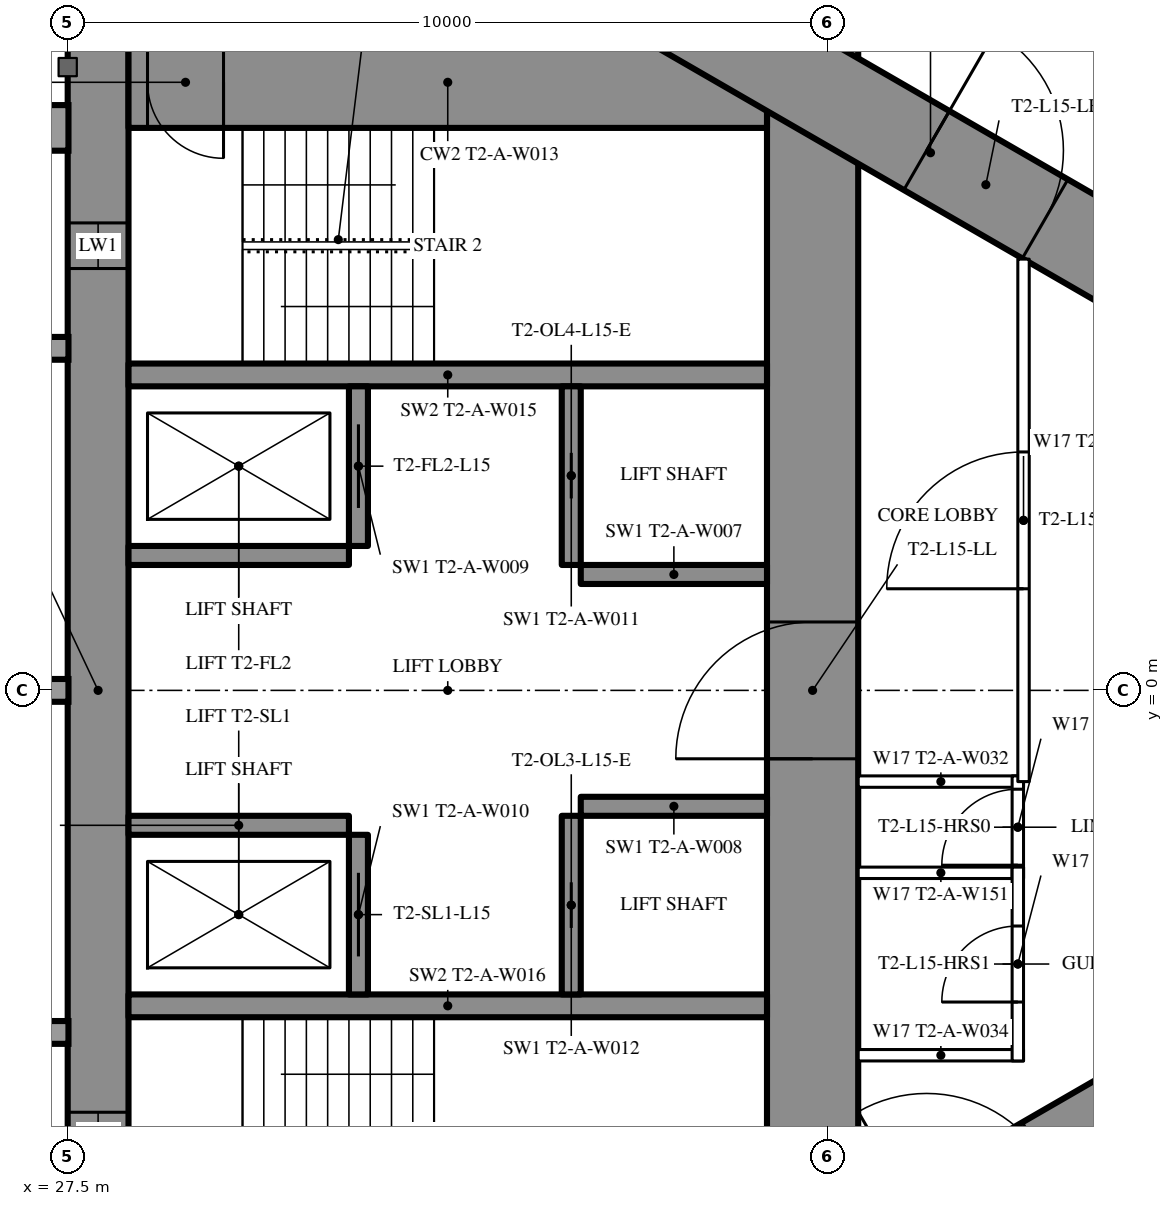
"""IFC4 building model, lengths in metres.
Left out: names, types, materials, properties, quantities, classifications, styles, units other than length and angle.
Written with IfcOpenShell. Run it as: python <this file> out.ifc"""

import sys

from ifc_helpers import new_model, si_unit, direction, frame, frame_2d, origin, place, context, subcontext, project, spatial, rectangle, extrude, element, fill, save


model = new_model("IFC4")
c1 = context("Model", 3, precision=1e-05, world=origin(), true_north=direction((0.0, 1.0)))
c2 = subcontext(c1, "Body", "Model", "MODEL_VIEW")
j1 = project(units=[si_unit("LENGTHUNIT", "METRE"), si_unit("PLANEANGLEUNIT", "RADIAN")], contexts=[c1])
p1 = place(None, origin())
s1 = spatial("IfcSite", under=j1, at=p1, CompositionType="ELEMENT")
p2 = place(p1, origin())
s2 = spatial("IfcBuilding", under=s1, at=p2, CompositionType="ELEMENT")
p3 = place(p2, frame((0.0, 0.0, 60.0)))
s3 = spatial("IfcBuildingStorey", under=s2, at=p3, CompositionType="ELEMENT", Elevation=60.0)
p4 = place(p3, frame((27.9, -8.6, 0.0), z_axis=(0.0, 0.0, 1.0), x_axis=(0.0, 1.0, 0.0)))
e1 = element("IfcWall", 1, at=p4, inside=s3, PredefinedType="SHEAR", context=c2, shape_type="SweptSolid", body=[
    extrude(rectangle(XDim=17.2, YDim=0.8, at=frame_2d((8.6, 0.0))), origin(), (0.0, 0.0, 1.0), 3.5),
])
p5 = place(p4, frame((2.45, 0.0, 0.6)))
e2 = element("IfcOpeningElement", 2, at=p5, cuts=e1, PredefinedType="OPENING", context=c2, shape_type="SweptSolid", body=[
    extrude(rectangle(XDim=0.6, YDim=2.1, at=frame_2d((0.3, 1.05))), frame((0.0, 0.41, 0.0), z_axis=(0.0, -1.0, 0.0), x_axis=(1.0, 0.0, 0.0)), (0.0, 0.0, 1.0), 0.82),
])
p6 = place(p4, frame((14.15, 0.0, 0.6)))
e3 = element("IfcOpeningElement", 3, at=p6, cuts=e1, PredefinedType="OPENING", context=c2, shape_type="SweptSolid", body=[
    extrude(rectangle(XDim=0.6, YDim=2.1, at=frame_2d((0.3, 1.05))), frame((0.0, 0.41, 0.0), z_axis=(0.0, -1.0, 0.0), x_axis=(1.0, 0.0, 0.0)), (0.0, 0.0, 1.0), 0.82),
])
p7 = place(p3, frame((37.3, -8.6, 0.0), z_axis=(0.0, 0.0, 1.0), x_axis=(0.0, 1.0, 0.0)))
e4 = element("IfcWall", 4, at=p7, inside=s3, PredefinedType="SHEAR", context=c2, shape_type="SweptSolid", body=[
    extrude(rectangle(XDim=17.2, YDim=1.2, at=frame_2d((8.6, 0.0))), origin(), (0.0, 0.0, 1.0), 3.5),
])
p8 = place(p7, frame((7.7, 0.0, 0.0)))
e5 = element("IfcOpeningElement", 5, at=p8, cuts=e4, PredefinedType="OPENING", context=c2, shape_type="SweptSolid", body=[
    extrude(rectangle(XDim=1.8, YDim=2.2, at=frame_2d((0.9, 1.1))), frame((0.0, 0.61, 0.0), z_axis=(0.0, -1.0, 0.0), x_axis=(1.0, 0.0, 0.0)), (0.0, 0.0, 1.0), 1.22),
])
p9 = place(p3, frame((28.3, 8.0, 0.0), z_axis=(0.0, 0.0, 1.0), x_axis=(1.0, 0.0, 0.0)))
e6 = element("IfcWall", 6, at=p9, inside=s3, PredefinedType="SHEAR", context=c2, shape_type="SweptSolid", body=[
    extrude(rectangle(XDim=8.4, YDim=1.2, at=frame_2d((4.2, 0.0))), origin(), (0.0, 0.0, 1.0), 3.5),
])
p10 = place(p9, frame((0.25, 0.0, 0.0)))
e7 = element("IfcOpeningElement", 7, at=p10, cuts=e6, PredefinedType="OPENING", context=c2, shape_type="SweptSolid", body=[
    extrude(rectangle(XDim=1.0, YDim=2.2, at=frame_2d((0.5, 1.1))), frame((0.0, 0.61, 0.0), z_axis=(0.0, -1.0, 0.0), x_axis=(1.0, 0.0, 0.0)), (0.0, 0.0, 1.0), 1.22),
])
for number, where, z_axis, x_axis in (
    (8, (28.3, -4.15, 0.0), (0.0, 0.0, 1.0), (1.0, 0.0, 0.0)),
    (9, (28.3, 4.15, 0.0), (0.0, 0.0, 1.0), (1.0, 0.0, 0.0)),
):
    element("IfcWall", number, at=place(p3, frame(where, z_axis=z_axis, x_axis=x_axis)), inside=s3, PredefinedType="SHEAR", context=c2, shape_type="SweptSolid", body=[
        extrude(rectangle(XDim=8.4, YDim=0.3, at=frame_2d((4.2, 0.0))), origin(), (0.0, 0.0, 1.0), 3.5),
    ])
p11 = place(p3, frame((31.325, -4.0, 0.0), z_axis=(0.0, 0.0, 1.0), x_axis=(0.0, 1.0, 0.0)))
e10 = element("IfcWall", 10, at=p11, inside=s3, PredefinedType="SHEAR", context=c2, shape_type="SweptSolid", body=[
    extrude(rectangle(XDim=2.1, YDim=0.25, at=frame_2d((1.05, 0.0))), origin(), (0.0, 0.0, 1.0), 3.5),
])
p12 = place(p11, frame((0.5, 0.0, 0.0)))
e11 = element("IfcOpeningElement", 11, at=p12, cuts=e10, PredefinedType="OPENING", context=c2, shape_type="SweptSolid", body=[
    extrude(rectangle(XDim=1.1, YDim=2.2, at=frame_2d((0.55, 1.1))), frame((0.0, 0.135, 0.0), z_axis=(0.0, -1.0, 0.0), x_axis=(1.0, 0.0, 0.0)), (0.0, 0.0, 1.0), 0.27),
])
p13 = place(p3, frame((34.125, -4.0, 0.0), z_axis=(0.0, 0.0, 1.0), x_axis=(0.0, 1.0, 0.0)))
e12 = element("IfcWall", 12, at=p13, inside=s3, PredefinedType="SHEAR", context=c2, shape_type="SweptSolid", body=[
    extrude(rectangle(XDim=2.35, YDim=0.25, at=frame_2d((1.175, 0.0))), origin(), (0.0, 0.0, 1.0), 3.5),
])
p14 = place(p13, frame((0.875, 0.0, 0.0)))
e13 = element("IfcOpeningElement", 13, at=p14, cuts=e12, PredefinedType="OPENING", context=c2, shape_type="SweptSolid", body=[
    extrude(rectangle(XDim=0.6, YDim=2.0, at=frame_2d((0.3, 1.0))), frame((0.0, 0.135, 0.0), z_axis=(0.0, -1.0, 0.0), x_axis=(1.0, 0.0, 0.0)), (0.0, 0.0, 1.0), 0.27),
])
p15 = place(p3, frame((28.3, -1.775, 0.0), z_axis=(0.0, 0.0, 1.0), x_axis=(1.0, 0.0, 0.0)))
e14 = element("IfcWall", 14, at=p15, inside=s3, PredefinedType="SHEAR", context=c2, shape_type="SweptSolid", body=[
    extrude(rectangle(XDim=2.9, YDim=0.25, at=frame_2d((1.45, 0.0))), origin(), (0.0, 0.0, 1.0), 3.5),
])
p16 = place(p3, frame((34.25, -1.525, 0.0), z_axis=(0.0, 0.0, 1.0), x_axis=(1.0, 0.0, 0.0)))
e15 = element("IfcWall", 15, at=p16, inside=s3, PredefinedType="SHEAR", context=c2, shape_type="SweptSolid", body=[
    extrude(rectangle(XDim=2.45, YDim=0.25, at=frame_2d((1.225, 0.0))), origin(), (0.0, 0.0, 1.0), 3.5),
])
p17 = place(p3, frame((31.325, 1.9, 0.0), z_axis=(0.0, 0.0, 1.0), x_axis=(0.0, 1.0, 0.0)))
e16 = element("IfcWall", 16, at=p17, inside=s3, PredefinedType="SHEAR", context=c2, shape_type="SweptSolid", body=[
    extrude(rectangle(XDim=2.1, YDim=0.25, at=frame_2d((1.05, 0.0))), origin(), (0.0, 0.0, 1.0), 3.5),
])
p18 = place(p17, frame((0.5, 0.0, 0.0)))
e17 = element("IfcOpeningElement", 17, at=p18, cuts=e16, PredefinedType="OPENING", context=c2, shape_type="SweptSolid", body=[
    extrude(rectangle(XDim=1.1, YDim=2.2, at=frame_2d((0.55, 1.1))), frame((0.0, 0.135, 0.0), z_axis=(0.0, -1.0, 0.0), x_axis=(1.0, 0.0, 0.0)), (0.0, 0.0, 1.0), 0.27),
])
p19 = place(p3, frame((34.125, 1.65, 0.0), z_axis=(0.0, 0.0, 1.0), x_axis=(0.0, 1.0, 0.0)))
e18 = element("IfcWall", 18, at=p19, inside=s3, PredefinedType="SHEAR", context=c2, shape_type="SweptSolid", body=[
    extrude(rectangle(XDim=2.35, YDim=0.25, at=frame_2d((1.175, 0.0))), origin(), (0.0, 0.0, 1.0), 3.5),
])
p20 = place(p19, frame((0.875, 0.0, 0.0)))
e19 = element("IfcOpeningElement", 19, at=p20, cuts=e18, PredefinedType="OPENING", context=c2, shape_type="SweptSolid", body=[
    extrude(rectangle(XDim=0.6, YDim=2.0, at=frame_2d((0.3, 1.0))), frame((0.0, 0.135, 0.0), z_axis=(0.0, -1.0, 0.0), x_axis=(1.0, 0.0, 0.0)), (0.0, 0.0, 1.0), 0.27),
])
p21 = place(p3, frame((28.3, 1.775, 0.0), z_axis=(0.0, 0.0, 1.0), x_axis=(1.0, 0.0, 0.0)))
e20 = element("IfcWall", 20, at=p21, inside=s3, PredefinedType="SHEAR", context=c2, shape_type="SweptSolid", body=[
    extrude(rectangle(XDim=2.9, YDim=0.25, at=frame_2d((1.45, 0.0))), origin(), (0.0, 0.0, 1.0), 3.5),
])
p22 = place(p3, frame((34.25, 1.525, 0.0), z_axis=(0.0, 0.0, 1.0), x_axis=(1.0, 0.0, 0.0)))
e21 = element("IfcWall", 21, at=p22, inside=s3, PredefinedType="SHEAR", context=c2, shape_type="SweptSolid", body=[
    extrude(rectangle(XDim=2.45, YDim=0.25, at=frame_2d((1.225, 0.0))), origin(), (0.0, 0.0, 1.0), 3.5),
])
p23 = place(p3, frame((27.2, -13.8, 0.0), z_axis=(0.0, 0.0, 1.0), x_axis=(0.866027159892, 0.499996958321, 0.0)))
e22 = element("IfcWall", 22, at=p23, inside=s3, PredefinedType="SHEAR", context=c2, shape_type="SweptSolid", body=[
    extrude(rectangle(XDim=27.947, YDim=1.2, at=frame_2d((13.973, 0.0))), origin(), (0.0, 0.0, 1.0), 3.5),
])
p24 = place(p23, frame((4.6, 0.0, 0.0)))
e23 = element("IfcOpeningElement", 23, at=p24, cuts=e22, PredefinedType="OPENING", context=c2, shape_type="SweptSolid", body=[
    extrude(rectangle(XDim=1.0, YDim=2.2, at=frame_2d((0.5, 1.1))), frame((0.0, 0.61, 0.0), z_axis=(0.0, -1.0, 0.0), x_axis=(1.0, 0.0, 0.0)), (0.0, 0.0, 1.0), 1.22),
])
p25 = place(p23, frame((13.395, 0.0, 0.0)))
e24 = element("IfcOpeningElement", 24, at=p25, cuts=e22, PredefinedType="OPENING", context=c2, shape_type="SweptSolid", body=[
    extrude(rectangle(XDim=1.8, YDim=2.2, at=frame_2d((0.9, 1.1))), frame((0.0, 0.61, 0.0), z_axis=(0.0, -1.0, 0.0), x_axis=(1.0, 0.0, 0.0)), (0.0, 0.0, 1.0), 1.22),
])
p26 = place(p3, frame((27.2, 13.8, 0.0), z_axis=(0.0, 0.0, 1.0), x_axis=(0.866024515034, -0.500001539357, 0.0)))
e25 = element("IfcWall", 25, at=p26, inside=s3, PredefinedType="SHEAR", context=c2, shape_type="SweptSolid", body=[
    extrude(rectangle(XDim=26.907, YDim=1.2, at=frame_2d((13.454, 0.0))), origin(), (0.0, 0.0, 1.0), 3.5),
])
p27 = place(p26, frame((4.6, 0.0, 0.0)))
e26 = element("IfcOpeningElement", 26, at=p27, cuts=e25, PredefinedType="OPENING", context=c2, shape_type="SweptSolid", body=[
    extrude(rectangle(XDim=1.0, YDim=2.2, at=frame_2d((0.5, 1.1))), frame((0.0, 0.61, 0.0), z_axis=(0.0, -1.0, 0.0), x_axis=(1.0, 0.0, 0.0)), (0.0, 0.0, 1.0), 1.22),
])
p28 = place(p26, frame((13.395, 0.0, 0.0)))
e27 = element("IfcOpeningElement", 27, at=p28, cuts=e25, PredefinedType="OPENING", context=c2, shape_type="SweptSolid", body=[
    extrude(rectangle(XDim=1.8, YDim=2.2, at=frame_2d((0.9, 1.1))), frame((0.0, 0.61, 0.0), z_axis=(0.0, -1.0, 0.0), x_axis=(1.0, 0.0, 0.0)), (0.0, 0.0, 1.0), 1.22),
])
p29 = place(p3, frame((36.834, 10.894, 0.0), z_axis=(0.0, 0.0, 1.0), x_axis=(0.866028157229, -0.499995230863, 0.0)))
e28 = element("IfcWall", 28, at=p29, inside=s3, PredefinedType="PARTITIONING", context=c2, shape_type="SweptSolid", body=[
    extrude(rectangle(XDim=21.667, YDim=0.2, at=frame_2d((10.833, 0.0))), origin(), (0.0, 0.0, 1.0), 3.25),
])
p30 = place(p29, frame((14.55, 0.0, 0.0)))
e29 = element("IfcOpeningElement", 29, at=p30, cuts=e28, PredefinedType="OPENING", context=c2, shape_type="SweptSolid", body=[
    extrude(rectangle(XDim=0.95, YDim=2.2, at=frame_2d((0.475, 1.1))), frame((0.0, 0.11, 0.0), z_axis=(0.0, -1.0, 0.0), x_axis=(1.0, 0.0, 0.0)), (0.0, 0.0, 1.0), 0.22),
])
p31 = place(p29, frame((10.5, 0.0, 0.0)))
e30 = element("IfcOpeningElement", 30, at=p31, cuts=e28, PredefinedType="OPENING", context=c2, shape_type="SweptSolid", body=[
    extrude(rectangle(XDim=0.95, YDim=2.2, at=frame_2d((0.475, 1.1))), frame((0.0, 0.11, 0.0), z_axis=(0.0, -1.0, 0.0), x_axis=(1.0, 0.0, 0.0)), (0.0, 0.0, 1.0), 0.22),
])
p32 = place(p29, frame((4.292, 0.0, 0.0)))
e31 = element("IfcOpeningElement", 31, at=p32, cuts=e28, PredefinedType="OPENING", context=c2, shape_type="SweptSolid", body=[
    extrude(rectangle(XDim=1.0, YDim=2.2, at=frame_2d((0.5, 1.1))), frame((0.0, 0.11, 0.0), z_axis=(0.0, -1.0, 0.0), x_axis=(1.0, 0.0, 0.0)), (0.0, 0.0, 1.0), 0.22),
])
p33 = place(p29, frame((0.246, 0.0, 0.0)))
e32 = element("IfcOpeningElement", 32, at=p33, cuts=e28, PredefinedType="OPENING", context=c2, shape_type="SweptSolid", body=[
    extrude(rectangle(XDim=0.9, YDim=2.2, at=frame_2d((0.45, 1.1))), frame((0.0, 0.11, 0.0), z_axis=(0.0, -1.0, 0.0), x_axis=(1.0, 0.0, 0.0)), (0.0, 0.0, 1.0), 0.22),
])
p34 = place(p3, frame((37.96, -10.243, 0.0), z_axis=(0.0, 0.0, 1.0), x_axis=(0.866030548046, 0.499991089772, 0.0)))
e33 = element("IfcWall", 33, at=p34, inside=s3, PredefinedType="PARTITIONING", context=c2, shape_type="SweptSolid", body=[
    extrude(rectangle(XDim=12.849, YDim=0.2, at=frame_2d((6.425, 0.0))), origin(), (0.0, 0.0, 1.0), 3.25),
])
p35 = place(p34, frame((4.575, 0.0, 0.0)))
e34 = element("IfcOpeningElement", 34, at=p35, cuts=e33, PredefinedType="OPENING", context=c2, shape_type="SweptSolid", body=[
    extrude(rectangle(XDim=0.95, YDim=2.2, at=frame_2d((0.475, 1.1))), frame((0.0, 0.11, 0.0), z_axis=(0.0, -1.0, 0.0), x_axis=(1.0, 0.0, 0.0)), (0.0, 0.0, 1.0), 0.22),
])
p36 = place(p34, frame((0.6, 0.0, 0.0)))
e35 = element("IfcOpeningElement", 35, at=p36, cuts=e33, PredefinedType="OPENING", context=c2, shape_type="SweptSolid", body=[
    extrude(rectangle(XDim=0.95, YDim=2.2, at=frame_2d((0.475, 1.1))), frame((0.0, 0.11, 0.0), z_axis=(0.0, -1.0, 0.0), x_axis=(1.0, 0.0, 0.0)), (0.0, 0.0, 1.0), 0.22),
])
for number, where, z_axis, x_axis in (
    (36, (37.9, -1.2, 0.0), (0.0, 0.0, 1.0), (1.0, 0.0, 0.0)),
    (37, (37.9, -2.4, 0.0), (0.0, 0.0, 1.0), (1.0, 0.0, 0.0)),
    (38, (37.9, -4.8, 0.0), (0.0, 0.0, 1.0), (1.0, 0.0, 0.0)),
):
    element("IfcWall", number, at=place(p3, frame(where, z_axis=z_axis, x_axis=x_axis)), inside=s3, PredefinedType="PARTITIONING", context=c2, shape_type="SweptSolid", body=[
        extrude(rectangle(XDim=2.175, YDim=0.15, at=frame_2d((1.087, 0.0))), origin(), (0.0, 0.0, 1.0), 3.25),
    ])
p37 = place(p3, frame((40.0, -2.475, 0.0), z_axis=(0.0, 0.0, 1.0), x_axis=(0.0, 1.0, 0.0)))
e39 = element("IfcWall", 39, at=p37, inside=s3, PredefinedType="PARTITIONING", context=c2, shape_type="SweptSolid", body=[
    extrude(rectangle(XDim=1.35, YDim=0.15, at=frame_2d((0.675, 0.0))), origin(), (0.0, 0.0, 1.0), 3.25),
])
p38 = place(p37, frame((0.175, 0.0, 0.0)))
e40 = element("IfcOpeningElement", 40, at=p38, cuts=e39, PredefinedType="OPENING", context=c2, shape_type="SweptSolid", body=[
    extrude(rectangle(XDim=1.0, YDim=2.2, at=frame_2d((0.5, 1.1))), frame((0.0, 0.085, 0.0), z_axis=(0.0, -1.0, 0.0), x_axis=(1.0, 0.0, 0.0)), (0.0, 0.0, 1.0), 0.17),
])
p39 = place(p3, frame((40.0, -4.875, 0.0), z_axis=(0.0, 0.0, 1.0), x_axis=(0.0, 1.0, 0.0)))
e41 = element("IfcWall", 41, at=p39, inside=s3, PredefinedType="PARTITIONING", context=c2, shape_type="SweptSolid", body=[
    extrude(rectangle(XDim=2.55, YDim=0.15, at=frame_2d((1.275, 0.0))), origin(), (0.0, 0.0, 1.0), 3.25),
])
p40 = place(p39, frame((0.775, 0.0, 0.0)))
e42 = element("IfcOpeningElement", 42, at=p40, cuts=e41, PredefinedType="OPENING", context=c2, shape_type="SweptSolid", body=[
    extrude(rectangle(XDim=1.0, YDim=2.2, at=frame_2d((0.5, 1.1))), frame((0.0, 0.085, 0.0), z_axis=(0.0, -1.0, 0.0), x_axis=(1.0, 0.0, 0.0)), (0.0, 0.0, 1.0), 0.17),
])
p41 = place(p3, frame((40.075, -1.2, 0.0), z_axis=(0.0, 0.0, 1.0), x_axis=(0.0, 1.0, 0.0)))
e43 = element("IfcWall", 43, at=p41, inside=s3, PredefinedType="PARTITIONING", context=c2, shape_type="SweptSolid", body=[
    extrude(rectangle(XDim=6.874, YDim=0.15, at=frame_2d((3.437, 0.0))), origin(), (0.0, 0.0, 1.0), 3.25),
])
p42 = place(p41, frame((2.537, 0.0, 0.0)))
e44 = element("IfcOpeningElement", 44, at=p42, cuts=e43, PredefinedType="OPENING", context=c2, shape_type="SweptSolid", body=[
    extrude(rectangle(XDim=1.8, YDim=2.2, at=frame_2d((0.9, 1.1))), frame((0.0, 0.085, 0.0), z_axis=(0.0, -1.0, 0.0), x_axis=(1.0, 0.0, 0.0)), (0.0, 0.0, 1.0), 0.17),
])
p43 = place(p32, origin())
e45 = element("IfcDoor", 45, at=p43, inside=s3, OperationType="SINGLE_SWING_LEFT", PredefinedType="DOOR", context=c2, shape_type="SweptSolid", body=[
    extrude(rectangle(XDim=1.0, YDim=2.2, at=frame_2d((0.5, 1.1))), frame((0.0, 0.025, 0.0), z_axis=(0.0, -1.0, 0.0), x_axis=(1.0, 0.0, 0.0)), (0.0, 0.0, 1.0), 0.05),
])
fill(e31, e45)
p44 = place(p38, origin())
e46 = element("IfcDoor", 46, at=p44, inside=s3, OperationType="SINGLE_SWING_LEFT", PredefinedType="DOOR", context=c2, shape_type="SweptSolid", body=[
    extrude(rectangle(XDim=1.0, YDim=2.2, at=frame_2d((0.5, 1.1))), frame((0.0, 0.025, 0.0), z_axis=(0.0, -1.0, 0.0), x_axis=(1.0, 0.0, 0.0)), (0.0, 0.0, 1.0), 0.05),
])
fill(e40, e46)
p45 = place(p40, origin())
e47 = element("IfcDoor", 47, at=p45, inside=s3, OperationType="SINGLE_SWING_LEFT", PredefinedType="DOOR", context=c2, shape_type="SweptSolid", body=[
    extrude(rectangle(XDim=1.0, YDim=2.2, at=frame_2d((0.5, 1.1))), frame((0.0, 0.025, 0.0), z_axis=(0.0, -1.0, 0.0), x_axis=(1.0, 0.0, 0.0)), (0.0, 0.0, 1.0), 0.05),
])
fill(e42, e47)
p46 = place(p42, origin())
e48 = element("IfcDoor", 48, at=p46, inside=s3, OperationType="DOUBLE_DOOR_SINGLE_SWING", PredefinedType="DOOR", context=c2, shape_type="SweptSolid", body=[
    extrude(rectangle(XDim=1.8, YDim=2.2, at=frame_2d((0.9, 1.1))), frame((0.0, 0.025, 0.0), z_axis=(0.0, -1.0, 0.0), x_axis=(1.0, 0.0, 0.0)), (0.0, 0.0, 1.0), 0.05),
])
fill(e44, e48)
p47 = place(p28, origin())
e49 = element("IfcDoor", 49, at=p47, inside=s3, OperationType="DOUBLE_DOOR_SINGLE_SWING", PredefinedType="DOOR", context=c2, shape_type="SweptSolid", body=[
    extrude(rectangle(XDim=1.8, YDim=2.2, at=frame_2d((0.9, 1.1))), frame((0.0, 0.025, 0.0), z_axis=(0.0, -1.0, 0.0), x_axis=(1.0, 0.0, 0.0)), (0.0, 0.0, 1.0), 0.05),
])
fill(e27, e49)
p48 = place(p8, origin())
e50 = element("IfcDoor", 50, at=p48, inside=s3, OperationType="DOUBLE_DOOR_SINGLE_SWING", PredefinedType="DOOR", context=c2, shape_type="SweptSolid", body=[
    extrude(rectangle(XDim=1.8, YDim=2.2, at=frame_2d((0.9, 1.1))), frame((0.0, 0.025, 0.0), z_axis=(0.0, -1.0, 0.0), x_axis=(1.0, 0.0, 0.0)), (0.0, 0.0, 1.0), 0.05),
])
fill(e5, e50)
p49 = place(p10, origin())
e51 = element("IfcDoor", 51, at=p49, inside=s3, OperationType="SINGLE_SWING_RIGHT", PredefinedType="DOOR", context=c2, shape_type="SweptSolid", body=[
    extrude(rectangle(XDim=1.0, YDim=2.2, at=frame_2d((0.5, 1.1))), frame((0.0, 0.025, 0.0), z_axis=(0.0, -1.0, 0.0), x_axis=(1.0, 0.0, 0.0)), (0.0, 0.0, 1.0), 0.05),
])
fill(e7, e51)
p50 = place(p12, origin())
e52 = element("IfcDoor", 52, at=p50, inside=s3, OperationType="SLIDING_TO_LEFT", PredefinedType="USERDEFINED", context=c2, shape_type="SweptSolid", body=[
    extrude(rectangle(XDim=1.1, YDim=2.2, at=frame_2d((0.55, 1.1))), frame((0.0, 0.025, 0.0), z_axis=(0.0, -1.0, 0.0), x_axis=(1.0, 0.0, 0.0)), (0.0, 0.0, 1.0), 0.05),
])
fill(e11, e52)
p51 = place(p18, origin())
e53 = element("IfcDoor", 53, at=p51, inside=s3, OperationType="SLIDING_TO_LEFT", PredefinedType="USERDEFINED", context=c2, shape_type="SweptSolid", body=[
    extrude(rectangle(XDim=1.1, YDim=2.2, at=frame_2d((0.55, 1.1))), frame((0.0, 0.025, 0.0), z_axis=(0.0, -1.0, 0.0), x_axis=(1.0, 0.0, 0.0)), (0.0, 0.0, 1.0), 0.05),
])
fill(e17, e53)
p52 = place(p14, origin())
e54 = element("IfcDoor", 54, at=p52, inside=s3, OperationType="SLIDING_TO_LEFT", PredefinedType="DOOR", context=c2, shape_type="SweptSolid", body=[
    extrude(rectangle(XDim=0.6, YDim=2.0, at=frame_2d((0.3, 1.0))), frame((0.0, 0.025, 0.0), z_axis=(0.0, -1.0, 0.0), x_axis=(1.0, 0.0, 0.0)), (0.0, 0.0, 1.0), 0.05),
])
fill(e13, e54)
p53 = place(p20, origin())
e55 = element("IfcDoor", 55, at=p53, inside=s3, OperationType="SLIDING_TO_LEFT", PredefinedType="DOOR", context=c2, shape_type="SweptSolid", body=[
    extrude(rectangle(XDim=0.6, YDim=2.0, at=frame_2d((0.3, 1.0))), frame((0.0, 0.025, 0.0), z_axis=(0.0, -1.0, 0.0), x_axis=(1.0, 0.0, 0.0)), (0.0, 0.0, 1.0), 0.05),
])
fill(e19, e55)
p54 = place(p5, origin())
e56 = element("IfcWindow", 56, at=p54, inside=s3, PartitioningType="SINGLE_PANEL", PredefinedType="WINDOW", context=c2, shape_type="SweptSolid", body=[
    extrude(rectangle(XDim=0.6, YDim=2.1, at=frame_2d((0.3, 1.05))), frame((0.0, 0.03, 0.0), z_axis=(0.0, -1.0, 0.0), x_axis=(1.0, 0.0, 0.0)), (0.0, 0.0, 1.0), 0.06),
])
fill(e2, e56)
p55 = place(p6, origin())
e57 = element("IfcWindow", 57, at=p55, inside=s3, PartitioningType="SINGLE_PANEL", PredefinedType="WINDOW", context=c2, shape_type="SweptSolid", body=[
    extrude(rectangle(XDim=0.6, YDim=2.1, at=frame_2d((0.3, 1.05))), frame((0.0, 0.03, 0.0), z_axis=(0.0, -1.0, 0.0), x_axis=(1.0, 0.0, 0.0)), (0.0, 0.0, 1.0), 0.06),
])
fill(e3, e57)
save(model, sys.argv[1])
